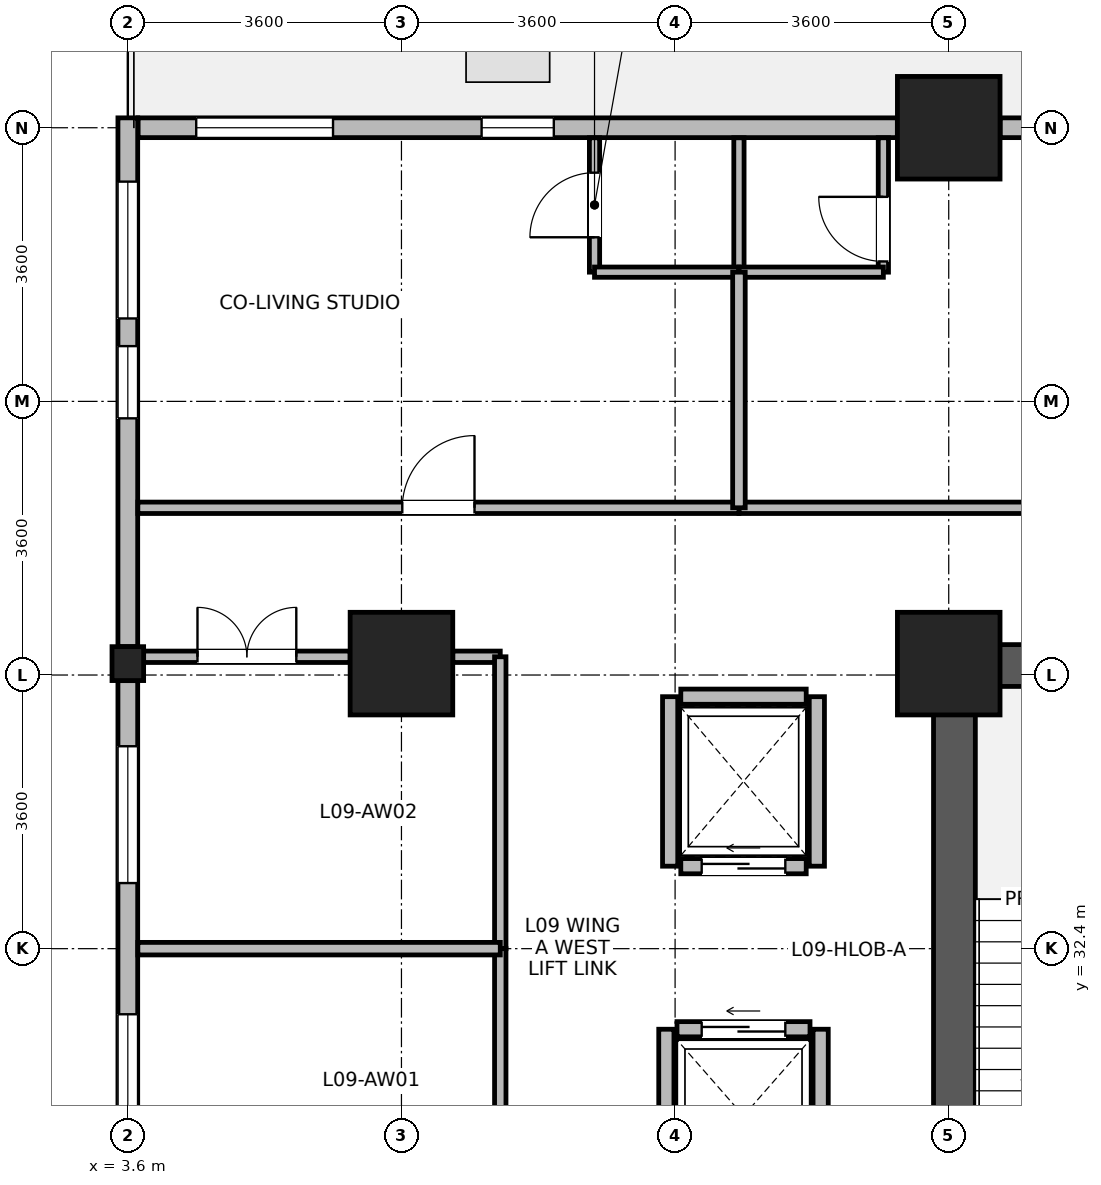
"""IFC4 building model, lengths in metres.
Left out: names, types, materials, properties, quantities, classifications, styles, units other than length and angle.
Written with IfcOpenShell. Run it as: python <this file> out.ifc"""

import sys

from ifc_helpers import new_model, si_unit, direction, frame, frame_2d, origin, origin_2d, place, context, subcontext, project, spatial, rectangle, i_section, extrude, source, transform, mapped, element, fill, save


model = new_model("IFC4")
c1 = context("Model", 3, precision=1e-05, world=origin(), true_north=direction((0.0, 1.0)))
c2 = subcontext(c1, "Body", "Model", "MODEL_VIEW")
j1 = project(units=[si_unit("LENGTHUNIT", "METRE"), si_unit("PLANEANGLEUNIT", "RADIAN")], contexts=[c1])
p1 = place(None, origin())
s1 = spatial("IfcSite", under=j1, at=p1, CompositionType="ELEMENT")
p2 = place(p1, origin())
s2 = spatial("IfcBuilding", under=s1, at=p2, CompositionType="ELEMENT")
p3 = place(p2, frame((0.0, 0.0, 40.1)))
s3 = spatial("IfcBuildingStorey", under=s2, at=p3, CompositionType="ELEMENT", Elevation=40.1)
p4 = place(p3, frame((14.475, 28.3, 0.0), z_axis=(0.0, 0.0, 1.0), x_axis=(0.0, 1.0, 0.0)))
e1 = element("IfcWall", 1, at=p4, inside=s3, PredefinedType="SHEAR", context=c2, shape_type="SweptSolid", body=[
    extrude(rectangle(XDim=8.1, YDim=0.55, at=frame_2d((4.05, 0.0))), origin(), (0.0, 0.0, 1.0), 3.45),
])
p5 = place(p3, frame((14.75, 36.125, 0.0), z_axis=(0.0, 0.0, 1.0), x_axis=(1.0, 0.0, 0.0)))
e2 = element("IfcWall", 2, at=p5, inside=s3, PredefinedType="SHEAR", context=c2, shape_type="SweptSolid", body=[
    extrude(rectangle(XDim=3.2, YDim=0.55, at=frame_2d((1.6, 0.0))), origin(), (0.0, 0.0, 1.0), 3.45),
])
m1 = source(origin(), c2, "Body", "SweptSolid", [
    extrude(rectangle(XDim=1.35, YDim=1.35, at=origin_2d()), origin(), (0.0, 0.0, 1.0), 3.7),
])
for number, where, z_axis, x_axis in (
    (3, (7.2, 36.15, 0.0), (0.0, 0.0, 1.0), (1.0, 0.0, 0.0)),
    (4, (14.4, 36.15, 0.0), (0.0, 0.0, 1.0), (1.0, 0.0, 0.0)),
    (5, (14.4, 43.2, 0.0), (0.0, 0.0, 1.0), (1.0, 0.0, 0.0)),
):
    element("IfcColumn", number, at=place(p3, frame(where, z_axis=z_axis, x_axis=x_axis)), inside=s3, PredefinedType="COLUMN", context=c2, shape_type="MappedRepresentation", body=[
        mapped(m1, transform((0.0, 0.0, 0.0), x_axis=(1.0, 0.0, 0.0), y_axis=(0.0, 1.0, 0.0), z_axis=(0.0, 0.0, 1.0), scale=1.0)),
    ])
m2 = source(origin(), c2, "Body", "SweptSolid", [
    extrude(i_section(OverallWidth=0.416, OverallDepth=0.446, WebThickness=0.029, FlangeThickness=0.04, FilletRadius=0.015, at=origin_2d()), origin(), (0.0, 0.0, 1.0), 3.7),
])
p6 = place(p3, frame((3.6, 36.15, 0.0), z_axis=(0.0, 0.0, 1.0), x_axis=(1.0, 0.0, 0.0)))
e6 = element("IfcColumn", 6, at=p6, inside=s3, PredefinedType="COLUMN", context=c2, shape_type="MappedRepresentation", body=[
    mapped(m2, transform((0.0, 0.0, 0.0), x_axis=(1.0, 0.0, 0.0), y_axis=(0.0, 1.0, 0.0), z_axis=(0.0, 0.0, 1.0), scale=1.0)),
])
p7 = place(p3, frame((15.076, 43.2, 0.0), z_axis=(0.0, 0.0, 1.0), x_axis=(1.0, 0.0, 0.0)))
e7 = element("IfcWall", 7, at=p7, inside=s3, PredefinedType="STANDARD", context=c2, shape_type="SweptSolid", body=[
    extrude(rectangle(XDim=2.715, YDim=0.26, at=frame_2d((1.357, 0.0))), origin(), (0.0, 0.0, 1.0), 2.93),
])
p8 = place(p7, frame((0.883, 0.0, 0.85)))
e8 = element("IfcOpeningElement", 8, at=p8, cuts=e7, PredefinedType="OPENING", context=c2, shape_type="SweptSolid", body=[
    extrude(rectangle(XDim=0.95, YDim=1.75, at=frame_2d((0.475, 0.875))), frame((0.0, 0.14, 0.0), z_axis=(0.0, -1.0, 0.0), x_axis=(1.0, 0.0, 0.0)), (0.0, 0.0, 1.0), 0.28),
])
p9 = place(p3, frame((3.735, 43.2, 0.0), z_axis=(0.0, 0.0, 1.0), x_axis=(1.0, 0.0, 0.0)))
e9 = element("IfcWall", 9, at=p9, inside=s3, PredefinedType="STANDARD", context=c2, shape_type="SweptSolid", body=[
    extrude(rectangle(XDim=9.989, YDim=0.26, at=frame_2d((4.995, 0.0))), origin(), (0.0, 0.0, 1.0), 3.43),
])
p10 = place(p9, frame((0.765, 0.0, 0.85)))
e10 = element("IfcOpeningElement", 10, at=p10, cuts=e9, PredefinedType="OPENING", context=c2, shape_type="SweptSolid", body=[
    extrude(rectangle(XDim=1.8, YDim=1.85, at=frame_2d((0.9, 0.925))), frame((0.0, 0.14, 0.0), z_axis=(0.0, -1.0, 0.0), x_axis=(1.0, 0.0, 0.0)), (0.0, 0.0, 1.0), 0.28),
])
p11 = place(p9, frame((4.52, 0.0, 0.85)))
e11 = element("IfcOpeningElement", 11, at=p11, cuts=e9, PredefinedType="OPENING", context=c2, shape_type="SweptSolid", body=[
    extrude(rectangle(XDim=0.95, YDim=1.75, at=frame_2d((0.475, 0.875))), frame((0.0, 0.14, 0.0), z_axis=(0.0, -1.0, 0.0), x_axis=(1.0, 0.0, 0.0)), (0.0, 0.0, 1.0), 0.28),
])
p12 = place(p3, frame((3.6, 36.374, 0.0), z_axis=(0.0, 0.0, 1.0), x_axis=(0.0, 1.0, 0.0)))
e12 = element("IfcWall", 12, at=p12, inside=s3, PredefinedType="STANDARD", context=c2, shape_type="SweptSolid", body=[
    extrude(rectangle(XDim=6.956, YDim=0.26, at=frame_2d((3.478, 0.0))), origin(), (0.0, 0.0, 1.0), 3.43),
])
p13 = place(p12, frame((4.317, 0.0, 0.85)))
e13 = element("IfcOpeningElement", 13, at=p13, cuts=e12, PredefinedType="OPENING", context=c2, shape_type="SweptSolid", body=[
    extrude(rectangle(XDim=1.8, YDim=1.85, at=frame_2d((0.9, 0.925))), frame((0.0, 0.14, 0.0), z_axis=(0.0, -1.0, 0.0), x_axis=(1.0, 0.0, 0.0)), (0.0, 0.0, 1.0), 0.28),
])
p14 = place(p12, frame((3.003, 0.0, 0.85)))
e14 = element("IfcOpeningElement", 14, at=p14, cuts=e12, PredefinedType="OPENING", context=c2, shape_type="SweptSolid", body=[
    extrude(rectangle(XDim=0.95, YDim=1.75, at=frame_2d((0.475, 0.875))), frame((0.0, 0.14, 0.0), z_axis=(0.0, -1.0, 0.0), x_axis=(1.0, 0.0, 0.0)), (0.0, 0.0, 1.0), 0.28),
])
p15 = place(p3, frame((3.6, 28.874, 0.0), z_axis=(0.0, 0.0, 1.0), x_axis=(0.0, 1.0, 0.0)))
e15 = element("IfcWall", 15, at=p15, inside=s3, PredefinedType="STANDARD", context=c2, shape_type="SweptSolid", body=[
    extrude(rectangle(XDim=7.052, YDim=0.26, at=frame_2d((3.526, 0.0))), origin(), (0.0, 0.0, 1.0), 2.93),
])
p16 = place(p15, frame((0.863, 0.0, 0.85)))
e16 = element("IfcOpeningElement", 16, at=p16, cuts=e15, PredefinedType="OPENING", context=c2, shape_type="SweptSolid", body=[
    extrude(rectangle(XDim=1.8, YDim=1.85, at=frame_2d((0.9, 0.925))), frame((0.0, 0.14, 0.0), z_axis=(0.0, -1.0, 0.0), x_axis=(1.0, 0.0, 0.0)), (0.0, 0.0, 1.0), 0.28),
])
p17 = place(p15, frame((4.389, 0.0, 0.85)))
e17 = element("IfcOpeningElement", 17, at=p17, cuts=e15, PredefinedType="OPENING", context=c2, shape_type="SweptSolid", body=[
    extrude(rectangle(XDim=1.8, YDim=1.85, at=frame_2d((0.9, 0.925))), frame((0.0, 0.14, 0.0), z_axis=(0.0, -1.0, 0.0), x_axis=(1.0, 0.0, 0.0)), (0.0, 0.0, 1.0), 0.28),
])
p18 = place(p3, frame((10.825, 31.34, 0.0), z_axis=(0.0, 0.0, 1.0), x_axis=(1.0, 0.0, 0.0)))
e18 = element("IfcWall", 18, at=p18, inside=s3, PredefinedType="PARTITIONING", context=c2, shape_type="SweptSolid", body=[
    extrude(rectangle(XDim=1.75, YDim=0.2, at=frame_2d((0.875, 0.0))), origin(), (0.0, 0.0, 1.0), 3.43),
])
p19 = place(p18, frame((0.325, 0.0, 0.0)))
e19 = element("IfcOpeningElement", 19, at=p19, cuts=e18, PredefinedType="OPENING", context=c2, shape_type="SweptSolid", body=[
    extrude(rectangle(XDim=1.1, YDim=2.12, at=frame_2d((0.55, 1.06))), frame((0.0, 0.11, 0.0), z_axis=(0.0, -1.0, 0.0), x_axis=(1.0, 0.0, 0.0)), (0.0, 0.0, 1.0), 0.22),
])
for number, where, z_axis, x_axis in (
    (20, (10.685, 29.06, 0.0), (0.0, 0.0, 1.0), (0.0, 1.0, 0.0)),
    (21, (12.715, 29.06, 0.0), (0.0, 0.0, 1.0), (0.0, 1.0, 0.0)),
):
    element("IfcWall", number, at=place(p3, frame(where, z_axis=z_axis, x_axis=x_axis)), inside=s3, PredefinedType="PARTITIONING", context=c2, shape_type="SweptSolid", body=[
        extrude(rectangle(XDim=2.28, YDim=0.2, at=frame_2d((1.14, 0.0))), origin(), (0.0, 0.0, 1.0), 3.43),
    ])
p20 = place(p3, frame((10.875, 33.485, 0.0), z_axis=(0.0, 0.0, 1.0), x_axis=(1.0, 0.0, 0.0)))
e22 = element("IfcWall", 22, at=p20, inside=s3, PredefinedType="PARTITIONING", context=c2, shape_type="SweptSolid", body=[
    extrude(rectangle(XDim=1.65, YDim=0.2, at=frame_2d((0.825, 0.0))), origin(), (0.0, 0.0, 1.0), 3.43),
])
p21 = place(p20, frame((0.275, 0.0, 0.0)))
e23 = element("IfcOpeningElement", 23, at=p21, cuts=e22, PredefinedType="OPENING", context=c2, shape_type="SweptSolid", body=[
    extrude(rectangle(XDim=1.1, YDim=2.12, at=frame_2d((0.55, 1.06))), frame((0.0, 0.11, 0.0), z_axis=(0.0, -1.0, 0.0), x_axis=(1.0, 0.0, 0.0)), (0.0, 0.0, 1.0), 0.22),
])
p22 = place(p3, frame((10.875, 35.715, 0.0), z_axis=(0.0, 0.0, 1.0), x_axis=(1.0, 0.0, 0.0)))
e24 = element("IfcWall", 24, at=p22, inside=s3, PredefinedType="PARTITIONING", context=c2, shape_type="SweptSolid", body=[
    extrude(rectangle(XDim=1.65, YDim=0.2, at=frame_2d((0.825, 0.0))), origin(), (0.0, 0.0, 1.0), 3.43),
])
for number, where, z_axis, x_axis in (
    (25, (10.735, 33.485, 0.0), (0.0, 0.0, 1.0), (0.0, 1.0, 0.0)),
    (26, (12.665, 33.485, 0.0), (0.0, 0.0, 1.0), (0.0, 1.0, 0.0)),
):
    element("IfcWall", number, at=place(p3, frame(where, z_axis=z_axis, x_axis=x_axis)), inside=s3, PredefinedType="PARTITIONING", context=c2, shape_type="SweptSolid", body=[
        extrude(rectangle(XDim=2.23, YDim=0.2, at=frame_2d((1.115, 0.0))), origin(), (0.0, 0.0, 1.0), 3.43),
    ])
p23 = place(p3, frame((9.74, 41.3, 0.0), z_axis=(0.0, 0.0, 1.0), x_axis=(0.0, 1.0, 0.0)))
e27 = element("IfcWall", 27, at=p23, inside=s3, PredefinedType="PARTITIONING", context=c2, shape_type="SweptSolid", body=[
    extrude(rectangle(XDim=1.768, YDim=0.135, at=frame_2d((0.884, 0.0))), origin(), (0.0, 0.0, 1.0), 3.43),
])
p24 = place(p23, frame((0.459, 0.0, 0.0)))
e28 = element("IfcOpeningElement", 28, at=p24, cuts=e27, PredefinedType="OPENING", context=c2, shape_type="SweptSolid", body=[
    extrude(rectangle(XDim=0.85, YDim=2.04, at=frame_2d((0.425, 1.02))), frame((0.0, 0.078, 0.0), z_axis=(0.0, -1.0, 0.0), x_axis=(1.0, 0.0, 0.0)), (0.0, 0.0, 1.0), 0.155),
])
p25 = place(p3, frame((11.64, 41.3, 0.0), z_axis=(0.0, 0.0, 1.0), x_axis=(0.0, 1.0, 0.0)))
e29 = element("IfcWall", 29, at=p25, inside=s3, PredefinedType="PARTITIONING", context=c2, shape_type="SweptSolid", body=[
    extrude(rectangle(XDim=1.768, YDim=0.135, at=frame_2d((0.884, 0.0))), origin(), (0.0, 0.0, 1.0), 3.43),
])
p26 = place(p3, frame((13.54, 41.3, 0.0), z_axis=(0.0, 0.0, 1.0), x_axis=(0.0, 1.0, 0.0)))
e30 = element("IfcWall", 30, at=p26, inside=s3, PredefinedType="PARTITIONING", context=c2, shape_type="SweptSolid", body=[
    extrude(rectangle(XDim=1.768, YDim=0.135, at=frame_2d((0.884, 0.0))), origin(), (0.0, 0.0, 1.0), 3.43),
])
p27 = place(p26, frame((0.141, 0.0, 0.0)))
e31 = element("IfcOpeningElement", 31, at=p27, cuts=e30, PredefinedType="OPENING", context=c2, shape_type="SweptSolid", body=[
    extrude(rectangle(XDim=0.85, YDim=2.04, at=frame_2d((0.425, 1.02))), frame((0.0, 0.078, 0.0), z_axis=(0.0, -1.0, 0.0), x_axis=(1.0, 0.0, 0.0)), (0.0, 0.0, 1.0), 0.155),
])
p28 = place(p3, frame((9.74, 41.3, 0.0), z_axis=(0.0, 0.0, 1.0), x_axis=(1.0, 0.0, 0.0)))
e32 = element("IfcWall", 32, at=p28, inside=s3, PredefinedType="PARTITIONING", context=c2, shape_type="SweptSolid", body=[
    extrude(rectangle(XDim=1.9, YDim=0.135, at=frame_2d((0.95, 0.0))), origin(), (0.0, 0.0, 1.0), 3.43),
])
p29 = place(p3, frame((11.64, 41.3, 0.0), z_axis=(0.0, 0.0, 1.0), x_axis=(1.0, 0.0, 0.0)))
e33 = element("IfcWall", 33, at=p29, inside=s3, PredefinedType="PARTITIONING", context=c2, shape_type="SweptSolid", body=[
    extrude(rectangle(XDim=1.9, YDim=0.135, at=frame_2d((0.95, 0.0))), origin(), (0.0, 0.0, 1.0), 3.43),
])
p30 = place(p3, frame((11.64, 38.2, 0.0), z_axis=(0.0, 0.0, 1.0), x_axis=(1.0, 0.0, 0.0)))
e34 = element("IfcWall", 34, at=p30, inside=s3, PredefinedType="PARTITIONING", context=c2, shape_type="SweptSolid", body=[
    extrude(rectangle(XDim=8.44, YDim=0.15, at=frame_2d((4.22, 0.0))), origin(), (0.0, 0.0, 1.0), 3.43),
])
p31 = place(p30, frame((3.745, 0.0, 0.0)))
e35 = element("IfcOpeningElement", 35, at=p31, cuts=e34, PredefinedType="OPENING", context=c2, shape_type="SweptSolid", body=[
    extrude(rectangle(XDim=0.95, YDim=2.1, at=frame_2d((0.475, 1.05))), frame((0.0, 0.085, 0.0), z_axis=(0.0, -1.0, 0.0), x_axis=(1.0, 0.0, 0.0)), (0.0, 0.0, 1.0), 0.17),
])
p32 = place(p3, frame((3.732, 38.2, 0.0), z_axis=(0.0, 0.0, 1.0), x_axis=(1.0, 0.0, 0.0)))
e36 = element("IfcWall", 36, at=p32, inside=s3, PredefinedType="PARTITIONING", context=c2, shape_type="SweptSolid", body=[
    extrude(rectangle(XDim=7.908, YDim=0.15, at=frame_2d((3.954, 0.0))), origin(), (0.0, 0.0, 1.0), 3.43),
])
p33 = place(p32, frame((3.479, 0.0, 0.0)))
e37 = element("IfcOpeningElement", 37, at=p33, cuts=e36, PredefinedType="OPENING", context=c2, shape_type="SweptSolid", body=[
    extrude(rectangle(XDim=0.95, YDim=2.1, at=frame_2d((0.475, 1.05))), frame((0.0, 0.085, 0.0), z_axis=(0.0, -1.0, 0.0), x_axis=(1.0, 0.0, 0.0)), (0.0, 0.0, 1.0), 0.17),
])
p34 = place(p3, frame((3.808, 36.24, 0.0), z_axis=(0.0, 0.0, 1.0), x_axis=(1.0, 0.0, 0.0)))
e38 = element("IfcWall", 38, at=p34, inside=s3, PredefinedType="PARTITIONING", context=c2, shape_type="SweptSolid", body=[
    extrude(rectangle(XDim=2.717, YDim=0.15, at=frame_2d((1.358, 0.0))), origin(), (0.0, 0.0, 1.0), 2.78),
])
p35 = place(p34, frame((0.708, 0.0, 0.0)))
e39 = element("IfcOpeningElement", 39, at=p35, cuts=e38, PredefinedType="OPENING", context=c2, shape_type="SweptSolid", body=[
    extrude(rectangle(XDim=1.3, YDim=2.12, at=frame_2d((0.65, 1.06))), frame((0.0, 0.085, 0.0), z_axis=(0.0, -1.0, 0.0), x_axis=(1.0, 0.0, 0.0)), (0.0, 0.0, 1.0), 0.17),
])
p36 = place(p3, frame((7.875, 36.24, 0.0), z_axis=(0.0, 0.0, 1.0), x_axis=(1.0, 0.0, 0.0)))
e40 = element("IfcWall", 40, at=p36, inside=s3, PredefinedType="PARTITIONING", context=c2, shape_type="SweptSolid", body=[
    extrude(rectangle(XDim=0.625, YDim=0.15, at=frame_2d((0.312, 0.0))), origin(), (0.0, 0.0, 1.0), 2.78),
])
p37 = place(p3, frame((8.5, 32.4, 0.0), z_axis=(0.0, 0.0, 1.0), x_axis=(0.0, 1.0, 0.0)))
e41 = element("IfcWall", 41, at=p37, inside=s3, PredefinedType="PARTITIONING", context=c2, shape_type="SweptSolid", body=[
    extrude(rectangle(XDim=3.84, YDim=0.15, at=frame_2d((1.92, 0.0))), origin(), (0.0, 0.0, 1.0), 3.43),
])
p38 = place(p3, frame((8.5, 28.56, 0.0), z_axis=(0.0, 0.0, 1.0), x_axis=(0.0, 1.0, 0.0)))
e42 = element("IfcWall", 42, at=p38, inside=s3, PredefinedType="PARTITIONING", context=c2, shape_type="SweptSolid", body=[
    extrude(rectangle(XDim=3.84, YDim=0.15, at=frame_2d((1.92, 0.0))), origin(), (0.0, 0.0, 1.0), 3.43),
])
p39 = place(p3, frame((3.732, 32.4, 0.0), z_axis=(0.0, 0.0, 1.0), x_axis=(1.0, 0.0, 0.0)))
e43 = element("IfcWall", 43, at=p39, inside=s3, PredefinedType="PARTITIONING", context=c2, shape_type="SweptSolid", body=[
    extrude(rectangle(XDim=4.768, YDim=0.165, at=frame_2d((2.384, 0.0))), origin(), (0.0, 0.0, 1.0), 3.43),
])
p40 = place(p3, frame((11.64, 38.2, 0.0), z_axis=(0.0, 0.0, 1.0), x_axis=(0.0, 1.0, 0.0)))
e44 = element("IfcWall", 44, at=p40, inside=s3, PredefinedType="PARTITIONING", context=c2, shape_type="SweptSolid", body=[
    extrude(rectangle(XDim=3.1, YDim=0.165, at=frame_2d((1.55, 0.0))), origin(), (0.0, 0.0, 1.0), 3.43),
])
p41 = place(p10, origin())
e45 = element("IfcWindow", 45, at=p41, inside=s3, PartitioningType="SINGLE_PANEL", PredefinedType="WINDOW", context=c2, shape_type="SweptSolid", body=[
    extrude(rectangle(XDim=1.8, YDim=1.85, at=frame_2d((0.9, 0.925))), frame((0.0, 0.03, 0.0), z_axis=(0.0, -1.0, 0.0), x_axis=(1.0, 0.0, 0.0)), (0.0, 0.0, 1.0), 0.06),
])
fill(e10, e45)
p42 = place(p11, origin())
e46 = element("IfcWindow", 46, at=p42, inside=s3, PartitioningType="SINGLE_PANEL", PredefinedType="WINDOW", context=c2, shape_type="SweptSolid", body=[
    extrude(rectangle(XDim=0.95, YDim=1.75, at=frame_2d((0.475, 0.875))), frame((0.0, 0.03, 0.0), z_axis=(0.0, -1.0, 0.0), x_axis=(1.0, 0.0, 0.0)), (0.0, 0.0, 1.0), 0.06),
])
fill(e11, e46)
p43 = place(p13, origin())
e47 = element("IfcWindow", 47, at=p43, inside=s3, PartitioningType="SINGLE_PANEL", PredefinedType="WINDOW", context=c2, shape_type="SweptSolid", body=[
    extrude(rectangle(XDim=1.8, YDim=1.85, at=frame_2d((0.9, 0.925))), frame((0.0, 0.03, 0.0), z_axis=(0.0, -1.0, 0.0), x_axis=(1.0, 0.0, 0.0)), (0.0, 0.0, 1.0), 0.06),
])
fill(e13, e47)
p44 = place(p14, origin())
e48 = element("IfcWindow", 48, at=p44, inside=s3, PartitioningType="SINGLE_PANEL", PredefinedType="WINDOW", context=c2, shape_type="SweptSolid", body=[
    extrude(rectangle(XDim=0.95, YDim=1.75, at=frame_2d((0.475, 0.875))), frame((0.0, 0.03, 0.0), z_axis=(0.0, -1.0, 0.0), x_axis=(1.0, 0.0, 0.0)), (0.0, 0.0, 1.0), 0.06),
])
fill(e14, e48)
p45 = place(p16, origin())
e49 = element("IfcWindow", 49, at=p45, inside=s3, PartitioningType="SINGLE_PANEL", PredefinedType="WINDOW", context=c2, shape_type="SweptSolid", body=[
    extrude(rectangle(XDim=1.8, YDim=1.85, at=frame_2d((0.9, 0.925))), frame((0.0, 0.03, 0.0), z_axis=(0.0, -1.0, 0.0), x_axis=(1.0, 0.0, 0.0)), (0.0, 0.0, 1.0), 0.06),
])
fill(e16, e49)
p46 = place(p17, origin())
e50 = element("IfcWindow", 50, at=p46, inside=s3, PartitioningType="SINGLE_PANEL", PredefinedType="WINDOW", context=c2, shape_type="SweptSolid", body=[
    extrude(rectangle(XDim=1.8, YDim=1.85, at=frame_2d((0.9, 0.925))), frame((0.0, 0.03, 0.0), z_axis=(0.0, -1.0, 0.0), x_axis=(1.0, 0.0, 0.0)), (0.0, 0.0, 1.0), 0.06),
])
fill(e17, e50)
p47 = place(p19, origin())
e51 = element("IfcDoor", 51, at=p47, inside=s3, OperationType="SLIDING_TO_LEFT", PredefinedType="DOOR", context=c2, shape_type="SweptSolid", body=[
    extrude(rectangle(XDim=1.1, YDim=2.12, at=frame_2d((0.55, 1.06))), frame((0.0, 0.025, 0.0), z_axis=(0.0, -1.0, 0.0), x_axis=(1.0, 0.0, 0.0)), (0.0, 0.0, 1.0), 0.05),
])
fill(e19, e51)
p48 = place(p21, origin())
e52 = element("IfcDoor", 52, at=p48, inside=s3, OperationType="SLIDING_TO_LEFT", PredefinedType="DOOR", context=c2, shape_type="SweptSolid", body=[
    extrude(rectangle(XDim=1.1, YDim=2.12, at=frame_2d((0.55, 1.06))), frame((0.0, 0.025, 0.0), z_axis=(0.0, -1.0, 0.0), x_axis=(1.0, 0.0, 0.0)), (0.0, 0.0, 1.0), 0.05),
])
fill(e23, e52)
p49 = place(p24, origin())
e53 = element("IfcDoor", 53, at=p49, inside=s3, OperationType="SINGLE_SWING_LEFT", PredefinedType="DOOR", context=c2, shape_type="SweptSolid", body=[
    extrude(rectangle(XDim=0.85, YDim=2.04, at=frame_2d((0.425, 1.02))), frame((0.0, 0.025, 0.0), z_axis=(0.0, -1.0, 0.0), x_axis=(1.0, 0.0, 0.0)), (0.0, 0.0, 1.0), 0.05),
])
fill(e28, e53)
p50 = place(p27, origin())
e54 = element("IfcDoor", 54, at=p50, inside=s3, OperationType="SINGLE_SWING_RIGHT", PredefinedType="DOOR", context=c2, shape_type="SweptSolid", body=[
    extrude(rectangle(XDim=0.85, YDim=2.04, at=frame_2d((0.425, 1.02))), frame((0.0, 0.025, 0.0), z_axis=(0.0, -1.0, 0.0), x_axis=(1.0, 0.0, 0.0)), (0.0, 0.0, 1.0), 0.05),
])
fill(e31, e54)
p51 = place(p33, origin())
e55 = element("IfcDoor", 55, at=p51, inside=s3, OperationType="SINGLE_SWING_RIGHT", PredefinedType="DOOR", context=c2, shape_type="SweptSolid", body=[
    extrude(rectangle(XDim=0.95, YDim=2.1, at=frame_2d((0.475, 1.05))), frame((0.0, 0.025, 0.0), z_axis=(0.0, -1.0, 0.0), x_axis=(1.0, 0.0, 0.0)), (0.0, 0.0, 1.0), 0.05),
])
fill(e37, e55)
p52 = place(p35, origin())
e56 = element("IfcDoor", 56, at=p52, inside=s3, OperationType="DOUBLE_DOOR_SINGLE_SWING", PredefinedType="DOOR", context=c2, shape_type="SweptSolid", body=[
    extrude(rectangle(XDim=1.3, YDim=2.12, at=frame_2d((0.65, 1.06))), frame((0.0, 0.025, 0.0), z_axis=(0.0, -1.0, 0.0), x_axis=(1.0, 0.0, 0.0)), (0.0, 0.0, 1.0), 0.05),
])
fill(e39, e56)
save(model, sys.argv[1])
